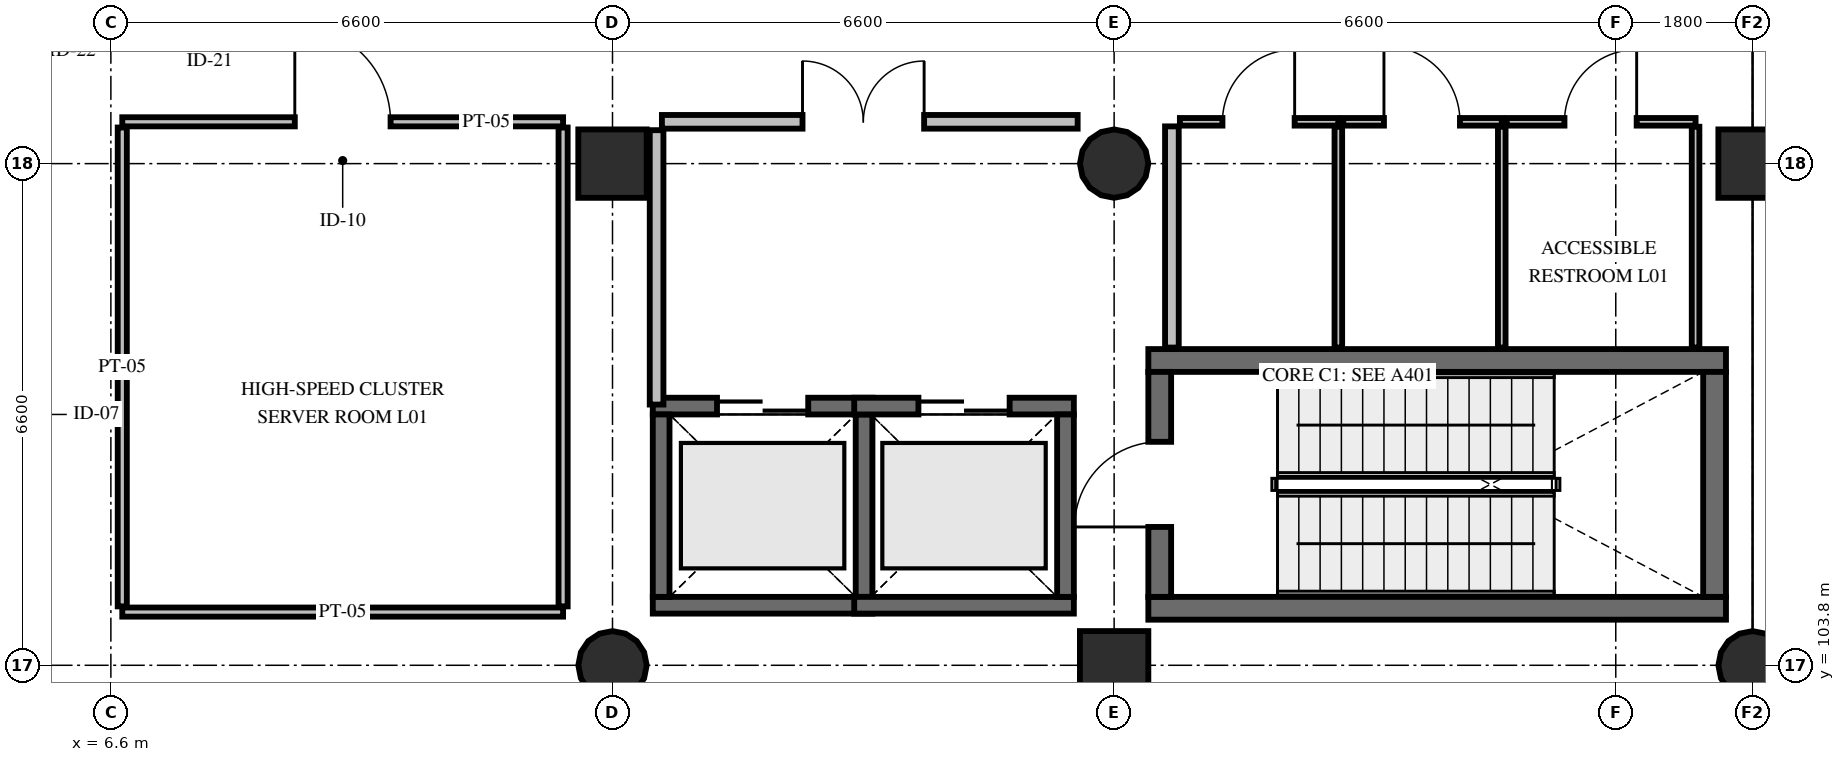
"""IFC4 building model, lengths in metres.
Left out: names, types, materials, properties, quantities, classifications, styles, units other than length and angle.
Written with IfcOpenShell. Run it as: python <this file> out.ifc"""

import sys

from ifc_helpers import new_model, si_unit, direction, frame, frame_2d, origin, origin_2d, place, context, subcontext, project, spatial, rectangle, circle, extrude, element, fill, save


model = new_model("IFC4")
c1 = context("Model", 3, precision=1e-05, world=origin(), true_north=direction((0.0, 1.0)))
c2 = subcontext(c1, "Body", "Model", "MODEL_VIEW")
j1 = project(units=[si_unit("LENGTHUNIT", "METRE"), si_unit("PLANEANGLEUNIT", "RADIAN")], contexts=[c1])
p1 = place(None, origin())
s1 = spatial("IfcSite", under=j1, at=p1, CompositionType="ELEMENT")
p2 = place(p1, origin())
s2 = spatial("IfcBuilding", under=s1, at=p2, CompositionType="ELEMENT")
p3 = place(p2, frame((0.0, 0.0, 5.4)))
s3 = spatial("IfcBuildingStorey", under=s2, at=p3, CompositionType="ELEMENT", Elevation=5.4)
p4 = place(p3, frame((13.2, 103.8, 0.0), z_axis=(0.0, 0.0, 1.0), x_axis=(1.0, 0.0, 0.0)))
e1 = element("IfcColumn", 1, at=p4, inside=s3, PredefinedType="COLUMN", context=c2, shape_type="SweptSolid", body=[
    extrude(circle(Radius=0.45, at=origin_2d()), origin(), (0.0, 0.0, 1.0), 4.8),
])
for number, where, z_axis, x_axis in (
    (2, (13.2, 110.4, 0.0), (0.0, 0.0, 1.0), (1.0, 0.0, 0.0)),
    (3, (19.8, 103.8, 0.0), (0.0, 0.0, 1.0), (1.0, 0.0, 0.0)),
):
    element("IfcColumn", number, at=place(p3, frame(where, z_axis=z_axis, x_axis=x_axis)), inside=s3, PredefinedType="COLUMN", context=c2, shape_type="SweptSolid", body=[
        extrude(rectangle(XDim=0.9, YDim=0.9, at=origin_2d()), origin(), (0.0, 0.0, 1.0), 4.8),
    ])
for number, where, z_axis, x_axis in (
    (4, (19.8, 110.4, 0.0), (0.0, 0.0, 1.0), (1.0, 0.0, 0.0)),
    (5, (28.2, 103.8, 0.0), (0.0, 0.0, 1.0), (1.0, 0.0, 0.0)),
):
    element("IfcColumn", number, at=place(p3, frame(where, z_axis=z_axis, x_axis=x_axis)), inside=s3, PredefinedType="COLUMN", context=c2, shape_type="SweptSolid", body=[
        extrude(circle(Radius=0.45, at=origin_2d()), origin(), (0.0, 0.0, 1.0), 4.8),
    ])
p5 = place(p3, frame((28.2, 110.4, 0.0), z_axis=(0.0, 0.0, 1.0), x_axis=(1.0, 0.0, 0.0)))
e6 = element("IfcColumn", 6, at=p5, inside=s3, PredefinedType="COLUMN", context=c2, shape_type="SweptSolid", body=[
    extrude(rectangle(XDim=0.9, YDim=0.9, at=origin_2d()), origin(), (0.0, 0.0, 1.0), 4.8),
])
for number, where, z_axis, x_axis in (
    (7, (20.25, 104.55, 0.0), (0.0, 0.0, 1.0), (1.0, 0.0, 0.0)),
    (8, (20.25, 107.81, 0.0), (0.0, 0.0, 1.0), (1.0, 0.0, 0.0)),
):
    element("IfcWall", number, at=place(p3, frame(where, z_axis=z_axis, x_axis=x_axis)), inside=s3, PredefinedType="SHEAR", context=c2, shape_type="SweptSolid", body=[
        extrude(rectangle(XDim=7.6, YDim=0.3, at=frame_2d((3.8, 0.0))), origin(), (0.0, 0.0, 1.0), 4.48),
    ])
p6 = place(p3, frame((20.4, 104.7, 0.0), z_axis=(0.0, 0.0, 1.0), x_axis=(0.0, 1.0, 0.0)))
e9 = element("IfcWall", 9, at=p6, inside=s3, PredefinedType="SHEAR", context=c2, shape_type="SweptSolid", body=[
    extrude(rectangle(XDim=2.96, YDim=0.3, at=frame_2d((1.48, 0.0))), origin(), (0.0, 0.0, 1.0), 4.48),
])
p7 = place(p6, frame((0.92, 0.0, 0.0)))
e10 = element("IfcOpeningElement", 10, at=p7, cuts=e9, PredefinedType="OPENING", context=c2, shape_type="SweptSolid", body=[
    extrude(rectangle(XDim=1.12, YDim=2.2, at=frame_2d((0.56, 1.1))), frame((0.0, 0.165, 0.0), z_axis=(0.0, -1.0, 0.0), x_axis=(1.0, 0.0, 0.0)), (0.0, 0.0, 1.0), 0.33),
])
p8 = place(p3, frame((27.7, 104.7, 0.0), z_axis=(0.0, 0.0, 1.0), x_axis=(0.0, 1.0, 0.0)))
e11 = element("IfcWall", 11, at=p8, inside=s3, PredefinedType="SHEAR", context=c2, shape_type="SweptSolid", body=[
    extrude(rectangle(XDim=2.96, YDim=0.3, at=frame_2d((1.48, 0.0))), origin(), (0.0, 0.0, 1.0), 4.48),
])
p9 = place(p3, frame((13.73, 104.59, 0.0), z_axis=(0.0, 0.0, 1.0), x_axis=(1.0, 0.0, 0.0)))
e12 = element("IfcWall", 12, at=p9, inside=s3, PredefinedType="SHEAR", context=c2, shape_type="SweptSolid", body=[
    extrude(rectangle(XDim=2.89, YDim=0.22, at=frame_2d((1.445, 0.0))), origin(), (0.0, 0.0, 1.0), 4.48),
])
p10 = place(p3, frame((13.73, 107.21, 0.0), z_axis=(0.0, 0.0, 1.0), x_axis=(1.0, 0.0, 0.0)))
e13 = element("IfcWall", 13, at=p10, inside=s3, PredefinedType="SHEAR", context=c2, shape_type="SweptSolid", body=[
    extrude(rectangle(XDim=2.89, YDim=0.22, at=frame_2d((1.445, 0.0))), origin(), (0.0, 0.0, 1.0), 4.48),
])
p11 = place(p10, frame((0.845, 0.0, 0.0)))
e14 = element("IfcOpeningElement", 14, at=p11, cuts=e13, PredefinedType="OPENING", context=c2, shape_type="SweptSolid", body=[
    extrude(rectangle(XDim=1.2, YDim=2.2, at=frame_2d((0.6, 1.1))), frame((0.0, 0.125, 0.0), z_axis=(0.0, -1.0, 0.0), x_axis=(1.0, 0.0, 0.0)), (0.0, 0.0, 1.0), 0.25),
])
for number, where, z_axis, x_axis in (
    (15, (13.84, 104.7, 0.0), (0.0, 0.0, 1.0), (0.0, 1.0, 0.0)),
    (16, (16.51, 104.7, 0.0), (0.0, 0.0, 1.0), (0.0, 1.0, 0.0)),
):
    element("IfcWall", number, at=place(p3, frame(where, z_axis=z_axis, x_axis=x_axis)), inside=s3, PredefinedType="SHEAR", context=c2, shape_type="SweptSolid", body=[
        extrude(rectangle(XDim=2.4, YDim=0.22, at=frame_2d((1.2, 0.0))), origin(), (0.0, 0.0, 1.0), 4.48),
    ])
p12 = place(p3, frame((16.38, 104.59, 0.0), z_axis=(0.0, 0.0, 1.0), x_axis=(1.0, 0.0, 0.0)))
e17 = element("IfcWall", 17, at=p12, inside=s3, PredefinedType="SHEAR", context=c2, shape_type="SweptSolid", body=[
    extrude(rectangle(XDim=2.89, YDim=0.22, at=frame_2d((1.445, 0.0))), origin(), (0.0, 0.0, 1.0), 4.48),
])
p13 = place(p3, frame((16.38, 107.21, 0.0), z_axis=(0.0, 0.0, 1.0), x_axis=(1.0, 0.0, 0.0)))
e18 = element("IfcWall", 18, at=p13, inside=s3, PredefinedType="SHEAR", context=c2, shape_type="SweptSolid", body=[
    extrude(rectangle(XDim=2.89, YDim=0.22, at=frame_2d((1.445, 0.0))), origin(), (0.0, 0.0, 1.0), 4.48),
])
p14 = place(p13, frame((0.845, 0.0, 0.0)))
e19 = element("IfcOpeningElement", 19, at=p14, cuts=e18, PredefinedType="OPENING", context=c2, shape_type="SweptSolid", body=[
    extrude(rectangle(XDim=1.2, YDim=2.2, at=frame_2d((0.6, 1.1))), frame((0.0, 0.125, 0.0), z_axis=(0.0, -1.0, 0.0), x_axis=(1.0, 0.0, 0.0)), (0.0, 0.0, 1.0), 0.25),
])
p15 = place(p3, frame((19.16, 104.7, 0.0), z_axis=(0.0, 0.0, 1.0), x_axis=(0.0, 1.0, 0.0)))
e20 = element("IfcWall", 20, at=p15, inside=s3, PredefinedType="SHEAR", context=c2, shape_type="SweptSolid", body=[
    extrude(rectangle(XDim=2.4, YDim=0.22, at=frame_2d((1.2, 0.0))), origin(), (0.0, 0.0, 1.0), 4.48),
])
p16 = place(p3, frame((13.85, 110.95, 0.0), z_axis=(0.0, 0.0, 1.0), x_axis=(1.0, 0.0, 0.0)))
e21 = element("IfcWall", 21, at=p16, inside=s3, PredefinedType="PARTITIONING", context=c2, shape_type="SweptSolid", body=[
    extrude(rectangle(XDim=5.47, YDim=0.18, at=frame_2d((2.735, 0.0))), origin(), (0.0, 0.0, 1.0), 4.295),
])
p17 = place(p16, frame((1.85, 0.0, 0.0)))
e22 = element("IfcOpeningElement", 22, at=p17, cuts=e21, PredefinedType="OPENING", context=c2, shape_type="SweptSolid", body=[
    extrude(rectangle(XDim=1.6, YDim=2.25, at=frame_2d((0.8, 1.125))), frame((0.0, 0.105, 0.0), z_axis=(0.0, -1.0, 0.0), x_axis=(1.0, 0.0, 0.0)), (0.0, 0.0, 1.0), 0.21),
])
p18 = place(p3, frame((13.78, 107.23, 0.0), z_axis=(0.0, 0.0, 1.0), x_axis=(0.0, 1.0, 0.0)))
e23 = element("IfcWall", 23, at=p18, inside=s3, PredefinedType="PARTITIONING", context=c2, shape_type="SweptSolid", body=[
    extrude(rectangle(XDim=3.61, YDim=0.18, at=frame_2d((1.805, 0.0))), origin(), (0.0, 0.0, 1.0), 4.13),
])
p19 = place(p3, frame((20.56, 107.98, 0.0), z_axis=(0.0, 0.0, 1.0), x_axis=(0.0, 1.0, 0.0)))
e24 = element("IfcWall", 24, at=p19, inside=s3, PredefinedType="PARTITIONING", context=c2, shape_type="SweptSolid", body=[
    extrude(rectangle(XDim=2.91, YDim=0.18, at=frame_2d((1.455, 0.0))), origin(), (0.0, 0.0, 1.0), 3.83),
])
p20 = place(p3, frame((20.665, 110.95, 0.0), z_axis=(0.0, 0.0, 1.0), x_axis=(1.0, 0.0, 0.0)))
e25 = element("IfcWall", 25, at=p20, inside=s3, PredefinedType="PARTITIONING", context=c2, shape_type="SweptSolid", body=[
    extrude(rectangle(XDim=2.085, YDim=0.1, at=frame_2d((1.042, 0.0))), origin(), (0.0, 0.0, 1.0), 4.295),
])
p21 = place(p20, frame((0.56, 0.0, 0.0)))
e26 = element("IfcOpeningElement", 26, at=p21, cuts=e25, PredefinedType="OPENING", context=c2, shape_type="SweptSolid", body=[
    extrude(rectangle(XDim=0.95, YDim=2.15, at=frame_2d((0.475, 1.075))), frame((0.0, 0.065, 0.0), z_axis=(0.0, -1.0, 0.0), x_axis=(1.0, 0.0, 0.0)), (0.0, 0.0, 1.0), 0.13),
])
p22 = place(p3, frame((22.75, 107.98, 0.0), z_axis=(0.0, 0.0, 1.0), x_axis=(0.0, 1.0, 0.0)))
e27 = element("IfcWall", 27, at=p22, inside=s3, PredefinedType="PARTITIONING", context=c2, shape_type="SweptSolid", body=[
    extrude(rectangle(XDim=2.905, YDim=0.1, at=frame_2d((1.453, 0.0))), origin(), (0.0, 0.0, 1.0), 3.83),
])
p23 = place(p3, frame((22.815, 110.95, 0.0), z_axis=(0.0, 0.0, 1.0), x_axis=(1.0, 0.0, 0.0)))
e28 = element("IfcWall", 28, at=p23, inside=s3, PredefinedType="PARTITIONING", context=c2, shape_type="SweptSolid", body=[
    extrude(rectangle(XDim=2.085, YDim=0.1, at=frame_2d((1.042, 0.0))), origin(), (0.0, 0.0, 1.0), 4.46),
])
p24 = place(p23, frame((0.535, 0.0, 0.0)))
e29 = element("IfcOpeningElement", 29, at=p24, cuts=e28, PredefinedType="OPENING", context=c2, shape_type="SweptSolid", body=[
    extrude(rectangle(XDim=1.0, YDim=2.15, at=frame_2d((0.5, 1.075))), frame((0.0, 0.065, 0.0), z_axis=(0.0, -1.0, 0.0), x_axis=(1.0, 0.0, 0.0)), (0.0, 0.0, 1.0), 0.13),
])
p25 = place(p3, frame((24.9, 107.98, 0.0), z_axis=(0.0, 0.0, 1.0), x_axis=(0.0, 1.0, 0.0)))
e30 = element("IfcWall", 30, at=p25, inside=s3, PredefinedType="PARTITIONING", context=c2, shape_type="SweptSolid", body=[
    extrude(rectangle(XDim=2.905, YDim=0.1, at=frame_2d((1.453, 0.0))), origin(), (0.0, 0.0, 1.0), 3.83),
])
p26 = place(p3, frame((24.965, 110.95, 0.0), z_axis=(0.0, 0.0, 1.0), x_axis=(1.0, 0.0, 0.0)))
e31 = element("IfcWall", 31, at=p26, inside=s3, PredefinedType="PARTITIONING", context=c2, shape_type="SweptSolid", body=[
    extrude(rectangle(XDim=2.485, YDim=0.1, at=frame_2d((1.242, 0.0))), origin(), (0.0, 0.0, 1.0), 4.295),
])
p27 = place(p26, frame((0.76, 0.0, 0.0)))
e32 = element("IfcOpeningElement", 32, at=p27, cuts=e31, PredefinedType="OPENING", context=c2, shape_type="SweptSolid", body=[
    extrude(rectangle(XDim=0.95, YDim=2.15, at=frame_2d((0.475, 1.075))), frame((0.0, 0.065, 0.0), z_axis=(0.0, -1.0, 0.0), x_axis=(1.0, 0.0, 0.0)), (0.0, 0.0, 1.0), 0.13),
])
p28 = place(p3, frame((27.45, 107.98, 0.0), z_axis=(0.0, 0.0, 1.0), x_axis=(0.0, 1.0, 0.0)))
e33 = element("IfcWall", 33, at=p28, inside=s3, PredefinedType="PARTITIONING", context=c2, shape_type="SweptSolid", body=[
    extrude(rectangle(XDim=2.905, YDim=0.1, at=frame_2d((1.453, 0.0))), origin(), (0.0, 0.0, 1.0), 3.83),
])
p29 = place(p3, frame((6.75, 104.5, 0.0), z_axis=(0.0, 0.0, 1.0), x_axis=(1.0, 0.0, 0.0)))
e34 = element("IfcWall", 34, at=p29, inside=s3, PredefinedType="PARTITIONING", context=c2, shape_type="SweptSolid", body=[
    extrude(rectangle(XDim=5.8, YDim=0.12, at=frame_2d((2.9, 0.0))), origin(), (0.0, 0.0, 1.0), 4.295),
])
p30 = place(p3, frame((6.75, 110.95, 0.0), z_axis=(0.0, 0.0, 1.0), x_axis=(1.0, 0.0, 0.0)))
e35 = element("IfcWall", 35, at=p30, inside=s3, PredefinedType="PARTITIONING", context=c2, shape_type="SweptSolid", body=[
    extrude(rectangle(XDim=5.8, YDim=0.12, at=frame_2d((2.9, 0.0))), origin(), (0.0, 0.0, 1.0), 4.295),
])
p31 = place(p30, frame((2.27, 0.0, 0.0)))
e36 = element("IfcOpeningElement", 36, at=p31, cuts=e35, PredefinedType="OPENING", context=c2, shape_type="SweptSolid", body=[
    extrude(rectangle(XDim=1.26, YDim=2.2, at=frame_2d((0.63, 1.1))), frame((0.0, 0.075, 0.0), z_axis=(0.0, -1.0, 0.0), x_axis=(1.0, 0.0, 0.0)), (0.0, 0.0, 1.0), 0.15),
])
for number, where, z_axis, x_axis in (
    (37, (6.75, 104.575, 0.0), (0.0, 0.0, 1.0), (0.0, 1.0, 0.0)),
    (38, (12.55, 104.575, 0.0), (0.0, 0.0, 1.0), (0.0, 1.0, 0.0)),
):
    element("IfcWall", number, at=place(p3, frame(where, z_axis=z_axis, x_axis=x_axis)), inside=s3, PredefinedType="PARTITIONING", context=c2, shape_type="SweptSolid", body=[
        extrude(rectangle(XDim=6.3, YDim=0.12, at=frame_2d((3.15, 0.0))), origin(), (0.0, 0.0, 1.0), 3.83),
    ])
p32 = place(p7, origin())
e39 = element("IfcDoor", 39, at=p32, inside=s3, OperationType="SINGLE_SWING_LEFT", PredefinedType="DOOR", context=c2, shape_type="SweptSolid", body=[
    extrude(rectangle(XDim=1.12, YDim=2.2, at=frame_2d((0.56, 1.1))), frame((0.0, 0.025, 0.0), z_axis=(0.0, -1.0, 0.0), x_axis=(1.0, 0.0, 0.0)), (0.0, 0.0, 1.0), 0.05),
])
fill(e10, e39)
p33 = place(p11, origin())
e40 = element("IfcDoor", 40, at=p33, inside=s3, OperationType="DOUBLE_DOOR_SLIDING", PredefinedType="DOOR", context=c2, shape_type="SweptSolid", body=[
    extrude(rectangle(XDim=1.2, YDim=2.2, at=frame_2d((0.6, 1.1))), frame((0.0, 0.025, 0.0), z_axis=(0.0, -1.0, 0.0), x_axis=(1.0, 0.0, 0.0)), (0.0, 0.0, 1.0), 0.05),
])
fill(e14, e40)
p34 = place(p14, origin())
e41 = element("IfcDoor", 41, at=p34, inside=s3, OperationType="DOUBLE_DOOR_SLIDING", PredefinedType="DOOR", context=c2, shape_type="SweptSolid", body=[
    extrude(rectangle(XDim=1.2, YDim=2.2, at=frame_2d((0.6, 1.1))), frame((0.0, 0.025, 0.0), z_axis=(0.0, -1.0, 0.0), x_axis=(1.0, 0.0, 0.0)), (0.0, 0.0, 1.0), 0.05),
])
fill(e19, e41)
p35 = place(p17, origin())
e42 = element("IfcDoor", 42, at=p35, inside=s3, OperationType="DOUBLE_DOOR_SINGLE_SWING", PredefinedType="DOOR", context=c2, shape_type="SweptSolid", body=[
    extrude(rectangle(XDim=1.6, YDim=2.25, at=frame_2d((0.8, 1.125))), frame((0.0, 0.025, 0.0), z_axis=(0.0, -1.0, 0.0), x_axis=(1.0, 0.0, 0.0)), (0.0, 0.0, 1.0), 0.05),
])
fill(e22, e42)
p36 = place(p21, origin())
e43 = element("IfcDoor", 43, at=p36, inside=s3, OperationType="SINGLE_SWING_RIGHT", PredefinedType="DOOR", context=c2, shape_type="SweptSolid", body=[
    extrude(rectangle(XDim=0.95, YDim=2.15, at=frame_2d((0.475, 1.075))), frame((0.0, 0.025, 0.0), z_axis=(0.0, -1.0, 0.0), x_axis=(1.0, 0.0, 0.0)), (0.0, 0.0, 1.0), 0.05),
])
fill(e26, e43)
p37 = place(p24, origin())
e44 = element("IfcDoor", 44, at=p37, inside=s3, OperationType="SINGLE_SWING_LEFT", PredefinedType="DOOR", context=c2, shape_type="SweptSolid", body=[
    extrude(rectangle(XDim=1.0, YDim=2.15, at=frame_2d((0.5, 1.075))), frame((0.0, 0.025, 0.0), z_axis=(0.0, -1.0, 0.0), x_axis=(1.0, 0.0, 0.0)), (0.0, 0.0, 1.0), 0.05),
])
fill(e29, e44)
p38 = place(p27, origin())
e45 = element("IfcDoor", 45, at=p38, inside=s3, OperationType="SINGLE_SWING_RIGHT", PredefinedType="DOOR", context=c2, shape_type="SweptSolid", body=[
    extrude(rectangle(XDim=0.95, YDim=2.15, at=frame_2d((0.475, 1.075))), frame((0.0, 0.025, 0.0), z_axis=(0.0, -1.0, 0.0), x_axis=(1.0, 0.0, 0.0)), (0.0, 0.0, 1.0), 0.05),
])
fill(e32, e45)
p39 = place(p31, origin())
e46 = element("IfcDoor", 46, at=p39, inside=s3, OperationType="SINGLE_SWING_LEFT", PredefinedType="DOOR", context=c2, shape_type="SweptSolid", body=[
    extrude(rectangle(XDim=1.26, YDim=2.2, at=frame_2d((0.63, 1.1))), frame((0.0, 0.025, 0.0), z_axis=(0.0, -1.0, 0.0), x_axis=(1.0, 0.0, 0.0)), (0.0, 0.0, 1.0), 0.05),
])
fill(e36, e46)
save(model, sys.argv[1])
